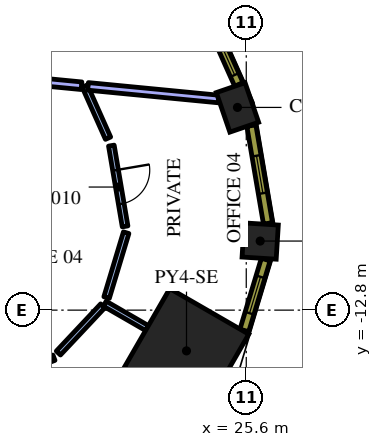
"""IFC4 building model, lengths in metres.
Left out: names, types, materials, properties, quantities, classifications, styles, units other than length and angle.
Written with IfcOpenShell. Run it as: python <this file> out.ifc"""

import sys

from ifc_helpers import new_model, si_unit, direction, frame, frame_2d, origin, origin_2d, place, context, subcontext, project, spatial, rectangle, extrude, element, fill, save


model = new_model("IFC4")
c1 = context("Model", 3, precision=1e-05, world=origin(), true_north=direction((0.0, 1.0)))
c2 = subcontext(c1, "Body", "Model", "MODEL_VIEW")
j1 = project(units=[si_unit("LENGTHUNIT", "METRE"), si_unit("PLANEANGLEUNIT", "RADIAN")], contexts=[c1])
p1 = place(None, origin())
s1 = spatial("IfcSite", under=j1, at=p1, CompositionType="ELEMENT")
p2 = place(p1, origin())
s2 = spatial("IfcBuilding", under=s1, at=p2, CompositionType="ELEMENT")
p3 = place(p2, frame((0.0, 0.0, 231.0)))
s3 = spatial("IfcBuildingStorey", under=s2, at=p3, CompositionType="ELEMENT", Elevation=231.0)
p4 = place(p3, frame((24.027, -13.872, 0.0), z_axis=(0.0, 0.0, 1.0), x_axis=(0.866025403784, -0.5, 0.0)))
e1 = element("IfcColumn", 1, at=p4, inside=s3, PredefinedType="COLUMN", context=c2, shape_type="SweptSolid", body=[
    extrude(rectangle(XDim=2.4, YDim=2.4, at=origin_2d()), origin(), (0.0, 0.0, 1.0), 4.2),
])
p5 = place(p3, frame((25.967, -10.982, 0.0), z_axis=(0.0, 0.0, 1.0), x_axis=(0.062217428964, 0.998062619044, 0.0)))
e2 = element("IfcColumn", 2, at=p5, inside=s3, PredefinedType="COLUMN", context=c2, shape_type="SweptSolid", body=[
    extrude(rectangle(XDim=0.9, YDim=0.9, at=origin_2d()), origin(), (0.0, 0.0, 1.0), 4.2),
])
p6 = place(p3, frame((25.369, -7.466, 0.0), z_axis=(0.0, 0.0, 1.0), x_axis=(-0.324074280638, 0.946031638281, 0.0)))
e3 = element("IfcColumn", 3, at=p6, inside=s3, PredefinedType="COLUMN", context=c2, shape_type="SweptSolid", body=[
    extrude(rectangle(XDim=1.1, YDim=0.8, at=origin_2d()), origin(), (0.0, 0.0, 1.0), 4.2),
])
p7 = place(p3, frame((21.877, -12.63, 0.0), z_axis=(0.0, 0.0, 1.0), x_axis=(0.86599869919, -0.500046250861, 0.0)))
e4 = element("IfcWall", 4, at=p7, inside=s3, PredefinedType="PARTITIONING", context=c2, shape_type="SweptSolid", body=[
    extrude(rectangle(XDim=1.284, YDim=0.15, at=frame_2d((0.642, 0.0))), origin(), (0.0, 0.0, 1.0), 3.45),
])
p8 = place(p3, frame((20.541, -14.052, 0.0), z_axis=(0.0, 0.0, 1.0), x_axis=(-0.937602119917, -0.347710029662, 0.0)))
e5 = element("IfcWall", 5, at=p8, inside=s3, PredefinedType="PARTITIONING", context=c2, shape_type="SweptSolid", body=[
    extrude(rectangle(XDim=2.11, YDim=0.15, at=frame_2d((1.055, 0.0))), origin(), (0.0, 0.0, 1.0), 3.45),
])
p9 = place(p8, frame((0.61, 0.0, 0.0)))
e6 = element("IfcOpeningElement", 6, at=p9, cuts=e5, PredefinedType="OPENING", context=c2, shape_type="SweptSolid", body=[
    extrude(rectangle(XDim=0.9, YDim=2.1, at=frame_2d((0.45, 1.05))), frame((0.0, 0.085, 0.0), z_axis=(0.0, -1.0, 0.0), x_axis=(1.0, 0.0, 0.0)), (0.0, 0.0, 1.0), 0.17),
])
p10 = place(p3, frame((20.656, -13.929, 0.0), z_axis=(0.0, 0.0, 1.0), x_axis=(0.684716940988, 0.728809104447, 0.0)))
e7 = element("IfcWall", 7, at=p10, inside=s3, PredefinedType="PARTITIONING", context=c2, shape_type="SweptSolid", body=[
    extrude(rectangle(XDim=1.705, YDim=0.15, at=frame_2d((0.853, 0.0))), origin(), (0.0, 0.0, 1.0), 3.45),
])
p11 = place(p3, frame((21.925, -12.469, 0.0), z_axis=(0.0, 0.0, 1.0), x_axis=(0.288767705809, 0.957399191603, 0.0)))
e8 = element("IfcWall", 8, at=p11, inside=s3, PredefinedType="PARTITIONING", context=c2, shape_type="SweptSolid", body=[
    extrude(rectangle(XDim=1.782, YDim=0.15, at=frame_2d((0.891, 0.0))), origin(), (0.0, 0.0, 1.0), 3.45),
])
p12 = place(p3, frame((22.05, -8.471, 0.0), z_axis=(0.0, 0.0, 1.0), x_axis=(0.167612004459, -0.985853039738, 0.0)))
e9 = element("IfcWall", 9, at=p12, inside=s3, PredefinedType="PARTITIONING", context=c2, shape_type="SweptSolid", body=[
    extrude(rectangle(XDim=2.156, YDim=0.15, at=frame_2d((1.078, 0.0))), origin(), (0.0, 0.0, 1.0), 3.45),
])
p13 = place(p12, frame((0.656, 0.0, 0.0)))
e10 = element("IfcOpeningElement", 10, at=p13, cuts=e9, PredefinedType="OPENING", context=c2, shape_type="SweptSolid", body=[
    extrude(rectangle(XDim=0.9, YDim=2.1, at=frame_2d((0.45, 1.05))), frame((0.0, 0.085, 0.0), z_axis=(0.0, -1.0, 0.0), x_axis=(1.0, 0.0, 0.0)), (0.0, 0.0, 1.0), 0.17),
])
p14 = place(p3, frame((21.963, -8.276, 0.0), z_axis=(0.0, 0.0, 1.0), x_axis=(-0.407510458183, 0.913200540118, 0.0)))
e11 = element("IfcWall", 11, at=p14, inside=s3, PredefinedType="PARTITIONING", context=c2, shape_type="SweptSolid", body=[
    extrude(rectangle(XDim=1.502, YDim=0.15, at=frame_2d((0.751, 0.0))), origin(), (0.0, 0.0, 1.0), 3.45),
])
p15 = place(p3, frame((21.437, -6.913, 0.0), z_axis=(0.0, 0.0, 1.0), x_axis=(0.995357015301, -0.096251816042, 0.0)))
e12 = element("IfcWall", 12, at=p15, inside=s3, PredefinedType="PARTITIONING", context=c2, shape_type="SweptSolid", body=[
    extrude(rectangle(XDim=3.45, YDim=0.2, at=frame_2d((1.725, 0.0))), origin(), (0.0, 0.0, 1.0), 3.45),
])
p16 = place(p3, frame((17.586, -6.54, 0.0), z_axis=(0.0, 0.0, 1.0), x_axis=(0.995358181524, -0.096239755158, 0.0)))
e13 = element("IfcWall", 13, at=p16, inside=s3, PredefinedType="PARTITIONING", context=c2, shape_type="SweptSolid", body=[
    extrude(rectangle(XDim=3.696, YDim=0.2, at=frame_2d((1.848, 0.0))), origin(), (0.0, 0.0, 1.0), 3.45),
])
p17 = place(p3, frame((25.55, -13.335, 0.0), z_axis=(0.0, 0.0, 1.0), x_axis=(0.288727209095, 0.957411405159, 0.0)))
e14 = element("IfcWall", 14, at=p17, inside=s3, PredefinedType="SOLIDWALL", context=c2, shape_type="SweptSolid", body=[
    extrude(rectangle(XDim=1.948, YDim=0.24, at=frame_2d((0.974, 0.0))), origin(), (0.0, 0.0, 1.0), 3.95),
])
p18 = place(p17, frame((0.474, 0.0, 0.9)))
e15 = element("IfcOpeningElement", 15, at=p18, cuts=e14, PredefinedType="OPENING", context=c2, shape_type="SweptSolid", body=[
    extrude(rectangle(XDim=1.0, YDim=2.55, at=frame_2d((0.5, 1.275))), frame((0.0, 0.13, 0.0), z_axis=(0.0, -1.0, 0.0), x_axis=(1.0, 0.0, 0.0)), (0.0, 0.0, 1.0), 0.26),
])
p19 = place(p3, frame((26.172, -10.517, 0.0), z_axis=(0.0, 0.0, 1.0), x_axis=(-0.167660055546, 0.985844869021, 0.0)))
e16 = element("IfcWall", 16, at=p19, inside=s3, PredefinedType="SOLIDWALL", context=c2, shape_type="SweptSolid", body=[
    extrude(rectangle(XDim=2.609, YDim=0.24, at=frame_2d((1.305, 0.0))), origin(), (0.0, 0.0, 1.0), 3.95),
])
p20 = place(p19, frame((0.805, 0.0, 0.9)))
e17 = element("IfcOpeningElement", 17, at=p20, cuts=e16, PredefinedType="OPENING", context=c2, shape_type="SweptSolid", body=[
    extrude(rectangle(XDim=1.0, YDim=2.55, at=frame_2d((0.5, 1.275))), frame((0.0, 0.13, 0.0), z_axis=(0.0, -1.0, 0.0), x_axis=(1.0, 0.0, 0.0)), (0.0, 0.0, 1.0), 0.26),
])
p21 = place(p3, frame((25.405, -6.861, 0.0), z_axis=(0.0, 0.0, 1.0), x_axis=(-0.407579651789, 0.913169659728, 0.0)))
e18 = element("IfcWall", 18, at=p21, inside=s3, PredefinedType="SOLIDWALL", context=c2, shape_type="SweptSolid", body=[
    extrude(rectangle(XDim=5.311, YDim=0.24, at=frame_2d((2.655, 0.0))), origin(), (0.0, 0.0, 1.0), 3.95),
])
p22 = place(p21, frame((0.271, 0.0, 0.9)))
e19 = element("IfcOpeningElement", 19, at=p22, cuts=e18, PredefinedType="OPENING", context=c2, shape_type="SweptSolid", body=[
    extrude(rectangle(XDim=1.5, YDim=2.55, at=frame_2d((0.75, 1.275))), frame((0.0, 0.13, 0.0), z_axis=(0.0, -1.0, 0.0), x_axis=(1.0, 0.0, 0.0)), (0.0, 0.0, 1.0), 0.26),
])
p23 = place(p21, frame((3.504, 0.0, 0.9)))
e20 = element("IfcOpeningElement", 20, at=p23, cuts=e18, PredefinedType="OPENING", context=c2, shape_type="SweptSolid", body=[
    extrude(rectangle(XDim=1.5, YDim=2.55, at=frame_2d((0.75, 1.275))), frame((0.0, 0.13, 0.0), z_axis=(0.0, -1.0, 0.0), x_axis=(1.0, 0.0, 0.0)), (0.0, 0.0, 1.0), 0.26),
])
p24 = place(p13, origin())
e21 = element("IfcDoor", 21, at=p24, inside=s3, OperationType="SINGLE_SWING_RIGHT", PredefinedType="DOOR", context=c2, shape_type="SweptSolid", body=[
    extrude(rectangle(XDim=0.9, YDim=2.1, at=frame_2d((0.45, 1.05))), frame((0.0, 0.025, 0.0), z_axis=(0.0, -1.0, 0.0), x_axis=(1.0, 0.0, 0.0)), (0.0, 0.0, 1.0), 0.05),
])
fill(e10, e21)
p25 = place(p18, origin())
e22 = element("IfcWindow", 22, at=p25, inside=s3, PartitioningType="SINGLE_PANEL", PredefinedType="WINDOW", context=c2, shape_type="SweptSolid", body=[
    extrude(rectangle(XDim=1.0, YDim=2.55, at=frame_2d((0.5, 1.275))), frame((0.0, 0.04, 0.0), z_axis=(0.0, -1.0, 0.0), x_axis=(1.0, 0.0, 0.0)), (0.0, 0.0, 1.0), 0.06),
])
fill(e15, e22)
p26 = place(p20, origin())
e23 = element("IfcWindow", 23, at=p26, inside=s3, PartitioningType="SINGLE_PANEL", PredefinedType="WINDOW", context=c2, shape_type="SweptSolid", body=[
    extrude(rectangle(XDim=1.0, YDim=2.55, at=frame_2d((0.5, 1.275))), frame((0.0, 0.04, 0.0), z_axis=(0.0, -1.0, 0.0), x_axis=(1.0, 0.0, 0.0)), (0.0, 0.0, 1.0), 0.06),
])
fill(e17, e23)
p27 = place(p22, origin())
e24 = element("IfcWindow", 24, at=p27, inside=s3, PartitioningType="SINGLE_PANEL", PredefinedType="WINDOW", context=c2, shape_type="SweptSolid", body=[
    extrude(rectangle(XDim=1.5, YDim=2.55, at=frame_2d((0.75, 1.275))), frame((0.0, 0.04, 0.0), z_axis=(0.0, -1.0, 0.0), x_axis=(1.0, 0.0, 0.0)), (0.0, 0.0, 1.0), 0.06),
])
fill(e19, e24)
save(model, sys.argv[1])
